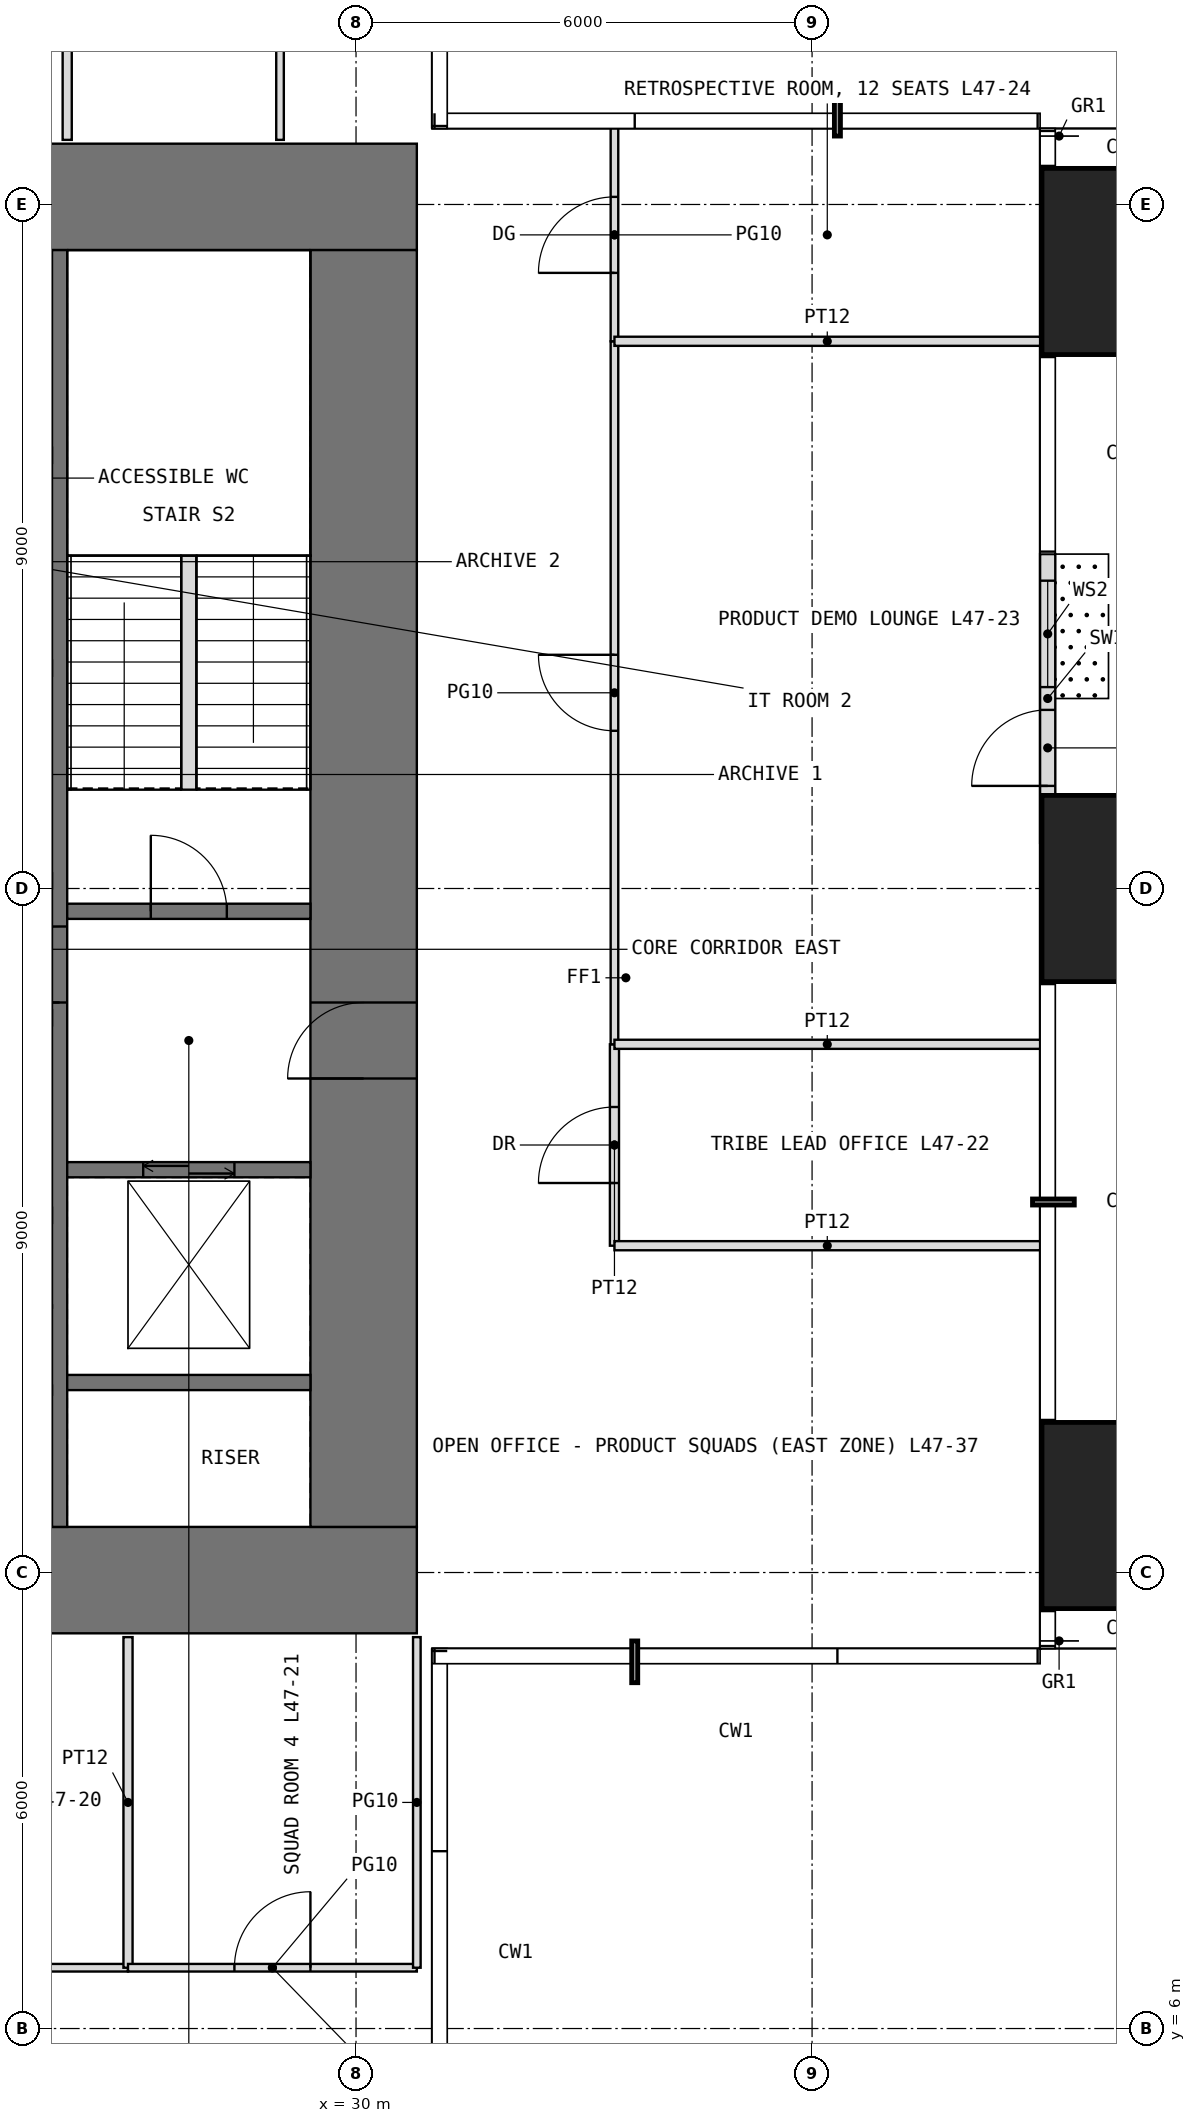
"""IFC4 building model, lengths in metres.
Left out: names, types, materials, properties, quantities, classifications, styles, units other than length and angle.
Written with IfcOpenShell. Run it as: python <this file> out.ifc"""

import sys

from ifc_helpers import new_model, si_unit, direction, frame, frame_2d, origin, origin_2d, place, context, subcontext, project, spatial, rectangle, extrude, element, fill, save


model = new_model("IFC4")
c1 = context("Model", 3, precision=1e-05, world=origin(), true_north=direction((0.0, 1.0)))
c2 = subcontext(c1, "Body", "Model", "MODEL_VIEW")
j1 = project(units=[si_unit("LENGTHUNIT", "METRE"), si_unit("PLANEANGLEUNIT", "RADIAN")], contexts=[c1])
p1 = place(None, origin())
s1 = spatial("IfcSite", under=j1, at=p1, CompositionType="ELEMENT")
p2 = place(p1, origin())
s2 = spatial("IfcBuilding", under=s1, at=p2, CompositionType="ELEMENT")
p3 = place(p2, frame((0.0, 0.0, 198.5)))
s3 = spatial("IfcBuildingStorey", under=s2, at=p3, CompositionType="ELEMENT", Elevation=198.5)
for number, where, z_axis, x_axis in (
    (1, (40.25, 12.75, 0.0), (0.0, 0.0, 1.0), (1.0, 0.0, 0.0)),
    (2, (40.25, 21.0, 0.0), (0.0, 0.0, 1.0), (1.0, 0.0, 0.0)),
    (3, (40.25, 29.25, 0.0), (0.0, 0.0, 1.0), (1.0, 0.0, 0.0)),
):
    element("IfcColumn", number, at=place(p3, frame(where, z_axis=z_axis, x_axis=x_axis)), inside=s3, PredefinedType="COLUMN", context=c2, shape_type="SweptSolid", body=[
        extrude(rectangle(XDim=2.45, YDim=2.45, at=origin_2d()), origin(), (0.0, 0.0, 1.0), 4.0),
    ])
p4 = place(p3, frame((39.1, 21.6, 0.0), z_axis=(0.0, 0.0, 1.0), x_axis=(0.0, 1.0, 0.0)))
e4 = element("IfcWall", 4, at=p4, inside=s3, PredefinedType="USERDEFINED", context=c2, shape_type="SweptSolid", body=[
    extrude(rectangle(XDim=3.8, YDim=0.2, at=frame_2d((1.9, 0.0))), origin(), (0.0, 0.0, 1.0), 3.75),
])
p5 = place(p4, frame((0.75, 0.0, 0.0)))
e5 = element("IfcOpeningElement", 5, at=p5, cuts=e4, PredefinedType="OPENING", context=c2, shape_type="SweptSolid", body=[
    extrude(rectangle(XDim=1.0, YDim=2.4, at=frame_2d((0.5, 1.2))), frame((0.0, 0.11, 0.0), z_axis=(0.0, -1.0, 0.0), x_axis=(1.0, 0.0, 0.0)), (0.0, 0.0, 1.0), 0.22),
])
p6 = place(p4, frame((2.05, 0.0, 0.3)))
e6 = element("IfcOpeningElement", 6, at=p6, cuts=e4, PredefinedType="OPENING", context=c2, shape_type="SweptSolid", body=[
    extrude(rectangle(XDim=1.4, YDim=2.7, at=frame_2d((0.7, 1.35))), frame((0.0, 0.11, 0.0), z_axis=(0.0, -1.0, 0.0), x_axis=(1.0, 0.0, 0.0)), (0.0, 0.0, 1.0), 0.22),
])
p7 = place(p3, frame((11.2, 11.9, -0.05), z_axis=(0.0, 0.0, 1.0), x_axis=(1.0, 0.0, 0.0)))
e7 = element("IfcWall", 7, at=p7, inside=s3, PredefinedType="SHEAR", context=c2, shape_type="SweptSolid", body=[
    extrude(rectangle(XDim=19.6, YDim=1.4, at=frame_2d((9.8, 0.0))), origin(), (0.0, 0.0, 1.0), 4.0),
])
p8 = place(p7, frame((8.8, 0.0, 0.05)))
e8 = element("IfcOpeningElement", 8, at=p8, cuts=e7, PredefinedType="OPENING", context=c2, shape_type="SweptSolid", body=[
    extrude(rectangle(XDim=2.0, YDim=2.2, at=frame_2d((1.0, 1.1))), frame((0.0, 0.71, 0.0), z_axis=(0.0, -1.0, 0.0), x_axis=(1.0, 0.0, 0.0)), (0.0, 0.0, 1.0), 1.42),
])
p9 = place(p3, frame((11.2, 30.1, -0.05), z_axis=(0.0, 0.0, 1.0), x_axis=(1.0, 0.0, 0.0)))
e9 = element("IfcWall", 9, at=p9, inside=s3, PredefinedType="SHEAR", context=c2, shape_type="SweptSolid", body=[
    extrude(rectangle(XDim=19.6, YDim=1.4, at=frame_2d((9.8, 0.0))), origin(), (0.0, 0.0, 1.0), 4.0),
])
p10 = place(p9, frame((8.8, 0.0, 0.05)))
e10 = element("IfcOpeningElement", 10, at=p10, cuts=e9, PredefinedType="OPENING", context=c2, shape_type="SweptSolid", body=[
    extrude(rectangle(XDim=2.0, YDim=2.2, at=frame_2d((1.0, 1.1))), frame((0.0, 0.71, 0.0), z_axis=(0.0, -1.0, 0.0), x_axis=(1.0, 0.0, 0.0)), (0.0, 0.0, 1.0), 1.42),
])
p11 = place(p3, frame((30.1, 12.6, -0.05), z_axis=(0.0, 0.0, 1.0), x_axis=(0.0, 1.0, 0.0)))
e11 = element("IfcWall", 11, at=p11, inside=s3, PredefinedType="SHEAR", context=c2, shape_type="SweptSolid", body=[
    extrude(rectangle(XDim=16.8, YDim=1.4, at=frame_2d((8.4, 0.0))), origin(), (0.0, 0.0, 1.0), 4.0),
])
p12 = place(p11, frame((5.9, 0.0, 0.05)))
e12 = element("IfcOpeningElement", 12, at=p12, cuts=e11, PredefinedType="OPENING", context=c2, shape_type="SweptSolid", body=[
    extrude(rectangle(XDim=1.0, YDim=2.2, at=frame_2d((0.5, 1.1))), frame((0.0, 0.71, 0.0), z_axis=(0.0, -1.0, 0.0), x_axis=(1.0, 0.0, 0.0)), (0.0, 0.0, 1.0), 1.42),
])
p13 = place(p3, frame((26.1, 12.6, -0.05), z_axis=(0.0, 0.0, 1.0), x_axis=(0.0, 1.0, 0.0)))
e13 = element("IfcWall", 13, at=p13, inside=s3, PredefinedType="SHEAR", context=c2, shape_type="SweptSolid", body=[
    extrude(rectangle(XDim=16.8, YDim=0.2, at=frame_2d((8.4, 0.0))), origin(), (0.0, 0.0, 1.0), 4.0),
])
p14 = place(p13, frame((6.9, 0.0, 0.05)))
e14 = element("IfcOpeningElement", 14, at=p14, cuts=e13, PredefinedType="OPENING", context=c2, shape_type="SweptSolid", body=[
    extrude(rectangle(XDim=1.0, YDim=2.2, at=frame_2d((0.5, 1.1))), frame((0.0, 0.11, 0.0), z_axis=(0.0, -1.0, 0.0), x_axis=(1.0, 0.0, 0.0)), (0.0, 0.0, 1.0), 0.22),
])
for number, where, z_axis, x_axis in (
    (15, (22.8, 16.7, -0.05), (0.0, 0.0, 1.0), (1.0, 0.0, 0.0)),
    (16, (22.8, 19.3, -0.05), (0.0, 0.0, 1.0), (1.0, 0.0, 0.0)),
    (17, (22.8, 21.1, -0.05), (0.0, 0.0, 1.0), (1.0, 0.0, 0.0)),
    (18, (22.8, 23.9, -0.05), (0.0, 0.0, 1.0), (1.0, 0.0, 0.0)),
    (19, (22.8, 26.7, -0.05), (0.0, 0.0, 1.0), (1.0, 0.0, 0.0)),
    (20, (26.2, 14.5, -0.05), (0.0, 0.0, 1.0), (1.0, 0.0, 0.0)),
):
    element("IfcWall", number, at=place(p3, frame(where, z_axis=z_axis, x_axis=x_axis)), inside=s3, PredefinedType="SHEAR", context=c2, shape_type="SweptSolid", body=[
        extrude(rectangle(XDim=3.2, YDim=0.2, at=frame_2d((1.6, 0.0))), origin(), (0.0, 0.0, 1.0), 4.0),
    ])
p15 = place(p3, frame((26.2, 17.3, -0.05), z_axis=(0.0, 0.0, 1.0), x_axis=(1.0, 0.0, 0.0)))
e21 = element("IfcWall", 21, at=p15, inside=s3, PredefinedType="SHEAR", context=c2, shape_type="SweptSolid", body=[
    extrude(rectangle(XDim=3.2, YDim=0.2, at=frame_2d((1.6, 0.0))), origin(), (0.0, 0.0, 1.0), 4.0),
])
p16 = place(p15, frame((1.0, 0.0, 0.05)))
e22 = element("IfcOpeningElement", 22, at=p16, cuts=e21, PredefinedType="OPENING", context=c2, shape_type="SweptSolid", body=[
    extrude(rectangle(XDim=1.2, YDim=2.2, at=frame_2d((0.6, 1.1))), frame((0.0, 0.11, 0.0), z_axis=(0.0, -1.0, 0.0), x_axis=(1.0, 0.0, 0.0)), (0.0, 0.0, 1.0), 0.22),
])
p17 = place(p3, frame((26.2, 20.7, -0.05), z_axis=(0.0, 0.0, 1.0), x_axis=(1.0, 0.0, 0.0)))
e23 = element("IfcWall", 23, at=p17, inside=s3, PredefinedType="SHEAR", context=c2, shape_type="SweptSolid", body=[
    extrude(rectangle(XDim=3.2, YDim=0.2, at=frame_2d((1.6, 0.0))), origin(), (0.0, 0.0, 1.0), 4.0),
])
p18 = place(p17, frame((1.1, 0.0, 0.05)))
e24 = element("IfcOpeningElement", 24, at=p18, cuts=e23, PredefinedType="OPENING", context=c2, shape_type="SweptSolid", body=[
    extrude(rectangle(XDim=1.0, YDim=2.2, at=frame_2d((0.5, 1.1))), frame((0.0, 0.11, 0.0), z_axis=(0.0, -1.0, 0.0), x_axis=(1.0, 0.0, 0.0)), (0.0, 0.0, 1.0), 0.22),
])
p19 = place(p3, frame((22.8, 14.4, 0.0), z_axis=(0.0, 0.0, 1.0), x_axis=(1.0, 0.0, 0.0)))
e25 = element("IfcWall", 25, at=p19, inside=s3, PredefinedType="PARTITIONING", context=c2, shape_type="SweptSolid", body=[
    extrude(rectangle(XDim=3.2, YDim=0.12, at=frame_2d((1.6, 0.0))), origin(), (0.0, 0.0, 1.0), 3.75),
])
p20 = place(p3, frame((23.4, 6.8, 0.0), z_axis=(0.0, 0.0, 1.0), x_axis=(1.0, 0.0, 0.0)))
e26 = element("IfcWall", 26, at=p20, inside=s3, PredefinedType="PARTITIONING", context=c2, shape_type="SweptSolid", body=[
    extrude(rectangle(XDim=3.6, YDim=0.1, at=frame_2d((1.8, 0.0))), origin(), (0.0, 0.0, 1.0), 3.75),
])
p21 = place(p20, frame((1.3, 0.0, 0.0)))
e27 = element("IfcOpeningElement", 27, at=p21, cuts=e26, PredefinedType="OPENING", context=c2, shape_type="SweptSolid", body=[
    extrude(rectangle(XDim=1.0, YDim=2.4, at=frame_2d((0.5, 1.2))), frame((0.0, 0.06, 0.0), z_axis=(0.0, -1.0, 0.0), x_axis=(1.0, 0.0, 0.0)), (0.0, 0.0, 1.0), 0.12),
])
p22 = place(p3, frame((26.2, 30.85, 0.0), z_axis=(0.0, 0.0, 1.0), x_axis=(0.0, 1.0, 0.0)))
e28 = element("IfcWall", 28, at=p22, inside=s3, PredefinedType="PARTITIONING", context=c2, shape_type="SweptSolid", body=[
    extrude(rectangle(XDim=3.55, YDim=0.12, at=frame_2d((1.775, 0.0))), origin(), (0.0, 0.0, 1.0), 3.75),
])
p23 = place(p3, frame((27.0, 6.8, 0.0), z_axis=(0.0, 0.0, 1.0), x_axis=(0.0, 1.0, 0.0)))
e29 = element("IfcWall", 29, at=p23, inside=s3, PredefinedType="PARTITIONING", context=c2, shape_type="SweptSolid", body=[
    extrude(rectangle(XDim=4.35, YDim=0.12, at=frame_2d((2.175, 0.0))), origin(), (0.0, 0.0, 1.0), 3.75),
])
p24 = place(p3, frame((27.0, 6.8, 0.0), z_axis=(0.0, 0.0, 1.0), x_axis=(1.0, 0.0, 0.0)))
e30 = element("IfcWall", 30, at=p24, inside=s3, PredefinedType="PARTITIONING", context=c2, shape_type="SweptSolid", body=[
    extrude(rectangle(XDim=3.8, YDim=0.1, at=frame_2d((1.9, 0.0))), origin(), (0.0, 0.0, 1.0), 3.75),
])
p25 = place(p24, frame((1.4, 0.0, 0.0)))
e31 = element("IfcOpeningElement", 31, at=p25, cuts=e30, PredefinedType="OPENING", context=c2, shape_type="SweptSolid", body=[
    extrude(rectangle(XDim=1.0, YDim=2.4, at=frame_2d((0.5, 1.2))), frame((0.0, 0.06, 0.0), z_axis=(0.0, -1.0, 0.0), x_axis=(1.0, 0.0, 0.0)), (0.0, 0.0, 1.0), 0.12),
])
p26 = place(p3, frame((29.0, 30.85, 0.0), z_axis=(0.0, 0.0, 1.0), x_axis=(0.0, 1.0, 0.0)))
e32 = element("IfcWall", 32, at=p26, inside=s3, PredefinedType="PARTITIONING", context=c2, shape_type="SweptSolid", body=[
    extrude(rectangle(XDim=3.55, YDim=0.1, at=frame_2d((1.775, 0.0))), origin(), (0.0, 0.0, 1.0), 3.75),
])
p27 = place(p3, frame((30.8, 6.8, 0.0), z_axis=(0.0, 0.0, 1.0), x_axis=(0.0, 1.0, 0.0)))
e33 = element("IfcWall", 33, at=p27, inside=s3, PredefinedType="PARTITIONING", context=c2, shape_type="SweptSolid", body=[
    extrude(rectangle(XDim=4.35, YDim=0.1, at=frame_2d((2.175, 0.0))), origin(), (0.0, 0.0, 1.0), 3.75),
])
p28 = place(p3, frame((33.4, 16.3, 0.0), z_axis=(0.0, 0.0, 1.0), x_axis=(0.0, 1.0, 0.0)))
e34 = element("IfcWall", 34, at=p28, inside=s3, PredefinedType="PARTITIONING", context=c2, shape_type="SweptSolid", body=[
    extrude(rectangle(XDim=2.65, YDim=0.12, at=frame_2d((1.325, 0.0))), origin(), (0.0, 0.0, 1.0), 3.75),
])
p29 = place(p28, frame((0.825, 0.0, 0.0)))
e35 = element("IfcOpeningElement", 35, at=p29, cuts=e34, PredefinedType="OPENING", context=c2, shape_type="SweptSolid", body=[
    extrude(rectangle(XDim=1.0, YDim=2.2, at=frame_2d((0.5, 1.1))), frame((0.0, 0.07, 0.0), z_axis=(0.0, -1.0, 0.0), x_axis=(1.0, 0.0, 0.0)), (0.0, 0.0, 1.0), 0.14),
])
p30 = place(p3, frame((33.4, 16.3, 0.0), z_axis=(0.0, 0.0, 1.0), x_axis=(1.0, 0.0, 0.0)))
e36 = element("IfcWall", 36, at=p30, inside=s3, PredefinedType="PARTITIONING", context=c2, shape_type="SweptSolid", body=[
    extrude(rectangle(XDim=5.6, YDim=0.12, at=frame_2d((2.8, 0.0))), origin(), (0.0, 0.0, 1.0), 3.75),
])
p31 = place(p3, frame((33.4, 18.95, 0.0), z_axis=(0.0, 0.0, 1.0), x_axis=(0.0, 1.0, 0.0)))
e37 = element("IfcWall", 37, at=p31, inside=s3, PredefinedType="PARTITIONING", context=c2, shape_type="SweptSolid", body=[
    extrude(rectangle(XDim=9.25, YDim=0.1, at=frame_2d((4.625, 0.0))), origin(), (0.0, 0.0, 1.0), 3.75),
])
p32 = place(p31, frame((4.125, 0.0, 0.0)))
e38 = element("IfcOpeningElement", 38, at=p32, cuts=e37, PredefinedType="OPENING", context=c2, shape_type="SweptSolid", body=[
    extrude(rectangle(XDim=1.0, YDim=2.4, at=frame_2d((0.5, 1.2))), frame((0.0, 0.06, 0.0), z_axis=(0.0, -1.0, 0.0), x_axis=(1.0, 0.0, 0.0)), (0.0, 0.0, 1.0), 0.12),
])
p33 = place(p3, frame((33.4, 18.95, 0.0), z_axis=(0.0, 0.0, 1.0), x_axis=(1.0, 0.0, 0.0)))
e39 = element("IfcWall", 39, at=p33, inside=s3, PredefinedType="PARTITIONING", context=c2, shape_type="SweptSolid", body=[
    extrude(rectangle(XDim=5.6, YDim=0.12, at=frame_2d((2.8, 0.0))), origin(), (0.0, 0.0, 1.0), 3.75),
])
p34 = place(p3, frame((33.4, 28.2, 0.0), z_axis=(0.0, 0.0, 1.0), x_axis=(0.0, 1.0, 0.0)))
e40 = element("IfcWall", 40, at=p34, inside=s3, PredefinedType="PARTITIONING", context=c2, shape_type="SweptSolid", body=[
    extrude(rectangle(XDim=2.8, YDim=0.1, at=frame_2d((1.4, 0.0))), origin(), (0.0, 0.0, 1.0), 3.75),
])
p35 = place(p34, frame((0.9, 0.0, 0.0)))
e41 = element("IfcOpeningElement", 41, at=p35, cuts=e40, PredefinedType="OPENING", context=c2, shape_type="SweptSolid", body=[
    extrude(rectangle(XDim=1.0, YDim=2.4, at=frame_2d((0.5, 1.2))), frame((0.0, 0.06, 0.0), z_axis=(0.0, -1.0, 0.0), x_axis=(1.0, 0.0, 0.0)), (0.0, 0.0, 1.0), 0.12),
])
p36 = place(p3, frame((33.4, 28.2, 0.0), z_axis=(0.0, 0.0, 1.0), x_axis=(1.0, 0.0, 0.0)))
e42 = element("IfcWall", 42, at=p36, inside=s3, PredefinedType="PARTITIONING", context=c2, shape_type="SweptSolid", body=[
    extrude(rectangle(XDim=5.6, YDim=0.12, at=frame_2d((2.8, 0.0))), origin(), (0.0, 0.0, 1.0), 3.75),
])
p37 = place(p3, frame((27.8, 22.3, 0.0), z_axis=(0.0, 0.0, 1.0), x_axis=(0.0, 1.0, 0.0)))
e43 = element("IfcWall", 43, at=p37, inside=s3, PredefinedType="PARTITIONING", context=c2, shape_type="SweptSolid", body=[
    extrude(rectangle(XDim=3.08, YDim=0.2, at=frame_2d((1.54, 0.0))), origin(), (0.0, 0.0, 1.0), 4.0),
])
p38 = place(p5, origin())
e44 = element("IfcDoor", 44, at=p38, inside=s3, OperationType="SINGLE_SWING_LEFT", PredefinedType="DOOR", context=c2, shape_type="SweptSolid", body=[
    extrude(rectangle(XDim=1.0, YDim=2.4, at=frame_2d((0.5, 1.2))), frame((0.0, 0.025, 0.0), z_axis=(0.0, -1.0, 0.0), x_axis=(1.0, 0.0, 0.0)), (0.0, 0.0, 1.0), 0.05),
])
fill(e5, e44)
p39 = place(p6, origin())
e45 = element("IfcWindow", 45, at=p39, inside=s3, PartitioningType="SINGLE_PANEL", PredefinedType="WINDOW", context=c2, shape_type="SweptSolid", body=[
    extrude(rectangle(XDim=1.4, YDim=2.7, at=frame_2d((0.7, 1.35))), frame((0.0, 0.03, 0.0), z_axis=(0.0, -1.0, 0.0), x_axis=(1.0, 0.0, 0.0)), (0.0, 0.0, 1.0), 0.06),
])
fill(e6, e45)
p40 = place(p12, origin())
e46 = element("IfcDoor", 46, at=p40, inside=s3, OperationType="SINGLE_SWING_LEFT", PredefinedType="DOOR", context=c2, shape_type="SweptSolid", body=[
    extrude(rectangle(XDim=1.0, YDim=2.2, at=frame_2d((0.5, 1.1))), frame((0.0, 0.025, 0.0), z_axis=(0.0, -1.0, 0.0), x_axis=(1.0, 0.0, 0.0)), (0.0, 0.0, 1.0), 0.05),
])
fill(e12, e46)
p41 = place(p18, origin())
e47 = element("IfcDoor", 47, at=p41, inside=s3, OperationType="SINGLE_SWING_LEFT", PredefinedType="DOOR", context=c2, shape_type="SweptSolid", body=[
    extrude(rectangle(XDim=1.0, YDim=2.2, at=frame_2d((0.5, 1.1))), frame((0.0, 0.025, 0.0), z_axis=(0.0, -1.0, 0.0), x_axis=(1.0, 0.0, 0.0)), (0.0, 0.0, 1.0), 0.05),
])
fill(e24, e47)
p42 = place(p14, origin())
e48 = element("IfcDoor", 48, at=p42, inside=s3, OperationType="SINGLE_SWING_LEFT", PredefinedType="DOOR", context=c2, shape_type="SweptSolid", body=[
    extrude(rectangle(XDim=1.0, YDim=2.2, at=frame_2d((0.5, 1.1))), frame((0.0, 0.025, 0.0), z_axis=(0.0, -1.0, 0.0), x_axis=(1.0, 0.0, 0.0)), (0.0, 0.0, 1.0), 0.05),
])
fill(e14, e48)
p43 = place(p25, origin())
e49 = element("IfcDoor", 49, at=p43, inside=s3, OperationType="SINGLE_SWING_RIGHT", PredefinedType="DOOR", context=c2, shape_type="SweptSolid", body=[
    extrude(rectangle(XDim=1.0, YDim=2.4, at=frame_2d((0.5, 1.2))), frame((0.0, 0.025, 0.0), z_axis=(0.0, -1.0, 0.0), x_axis=(1.0, 0.0, 0.0)), (0.0, 0.0, 1.0), 0.05),
])
fill(e31, e49)
p44 = place(p29, origin())
e50 = element("IfcDoor", 50, at=p44, inside=s3, OperationType="SINGLE_SWING_LEFT", PredefinedType="DOOR", context=c2, shape_type="SweptSolid", body=[
    extrude(rectangle(XDim=1.0, YDim=2.2, at=frame_2d((0.5, 1.1))), frame((0.0, 0.025, 0.0), z_axis=(0.0, -1.0, 0.0), x_axis=(1.0, 0.0, 0.0)), (0.0, 0.0, 1.0), 0.05),
])
fill(e35, e50)
p45 = place(p32, origin())
e51 = element("IfcDoor", 51, at=p45, inside=s3, OperationType="SINGLE_SWING_RIGHT", PredefinedType="DOOR", context=c2, shape_type="SweptSolid", body=[
    extrude(rectangle(XDim=1.0, YDim=2.4, at=frame_2d((0.5, 1.2))), frame((0.0, 0.025, 0.0), z_axis=(0.0, -1.0, 0.0), x_axis=(1.0, 0.0, 0.0)), (0.0, 0.0, 1.0), 0.05),
])
fill(e38, e51)
p46 = place(p35, origin())
e52 = element("IfcDoor", 52, at=p46, inside=s3, OperationType="SINGLE_SWING_LEFT", PredefinedType="DOOR", context=c2, shape_type="SweptSolid", body=[
    extrude(rectangle(XDim=1.0, YDim=2.4, at=frame_2d((0.5, 1.2))), frame((0.0, 0.025, 0.0), z_axis=(0.0, -1.0, 0.0), x_axis=(1.0, 0.0, 0.0)), (0.0, 0.0, 1.0), 0.05),
])
fill(e41, e52)
p47 = place(p16, origin())
e53 = element("IfcDoor", 53, at=p47, inside=s3, OperationType="DOUBLE_DOOR_SLIDING", PredefinedType="DOOR", context=c2, shape_type="SweptSolid", body=[
    extrude(rectangle(XDim=1.2, YDim=2.2, at=frame_2d((0.6, 1.1))), frame((0.0, 0.025, 0.0), z_axis=(0.0, -1.0, 0.0), x_axis=(1.0, 0.0, 0.0)), (0.0, 0.0, 1.0), 0.05),
])
fill(e22, e53)
save(model, sys.argv[1])
